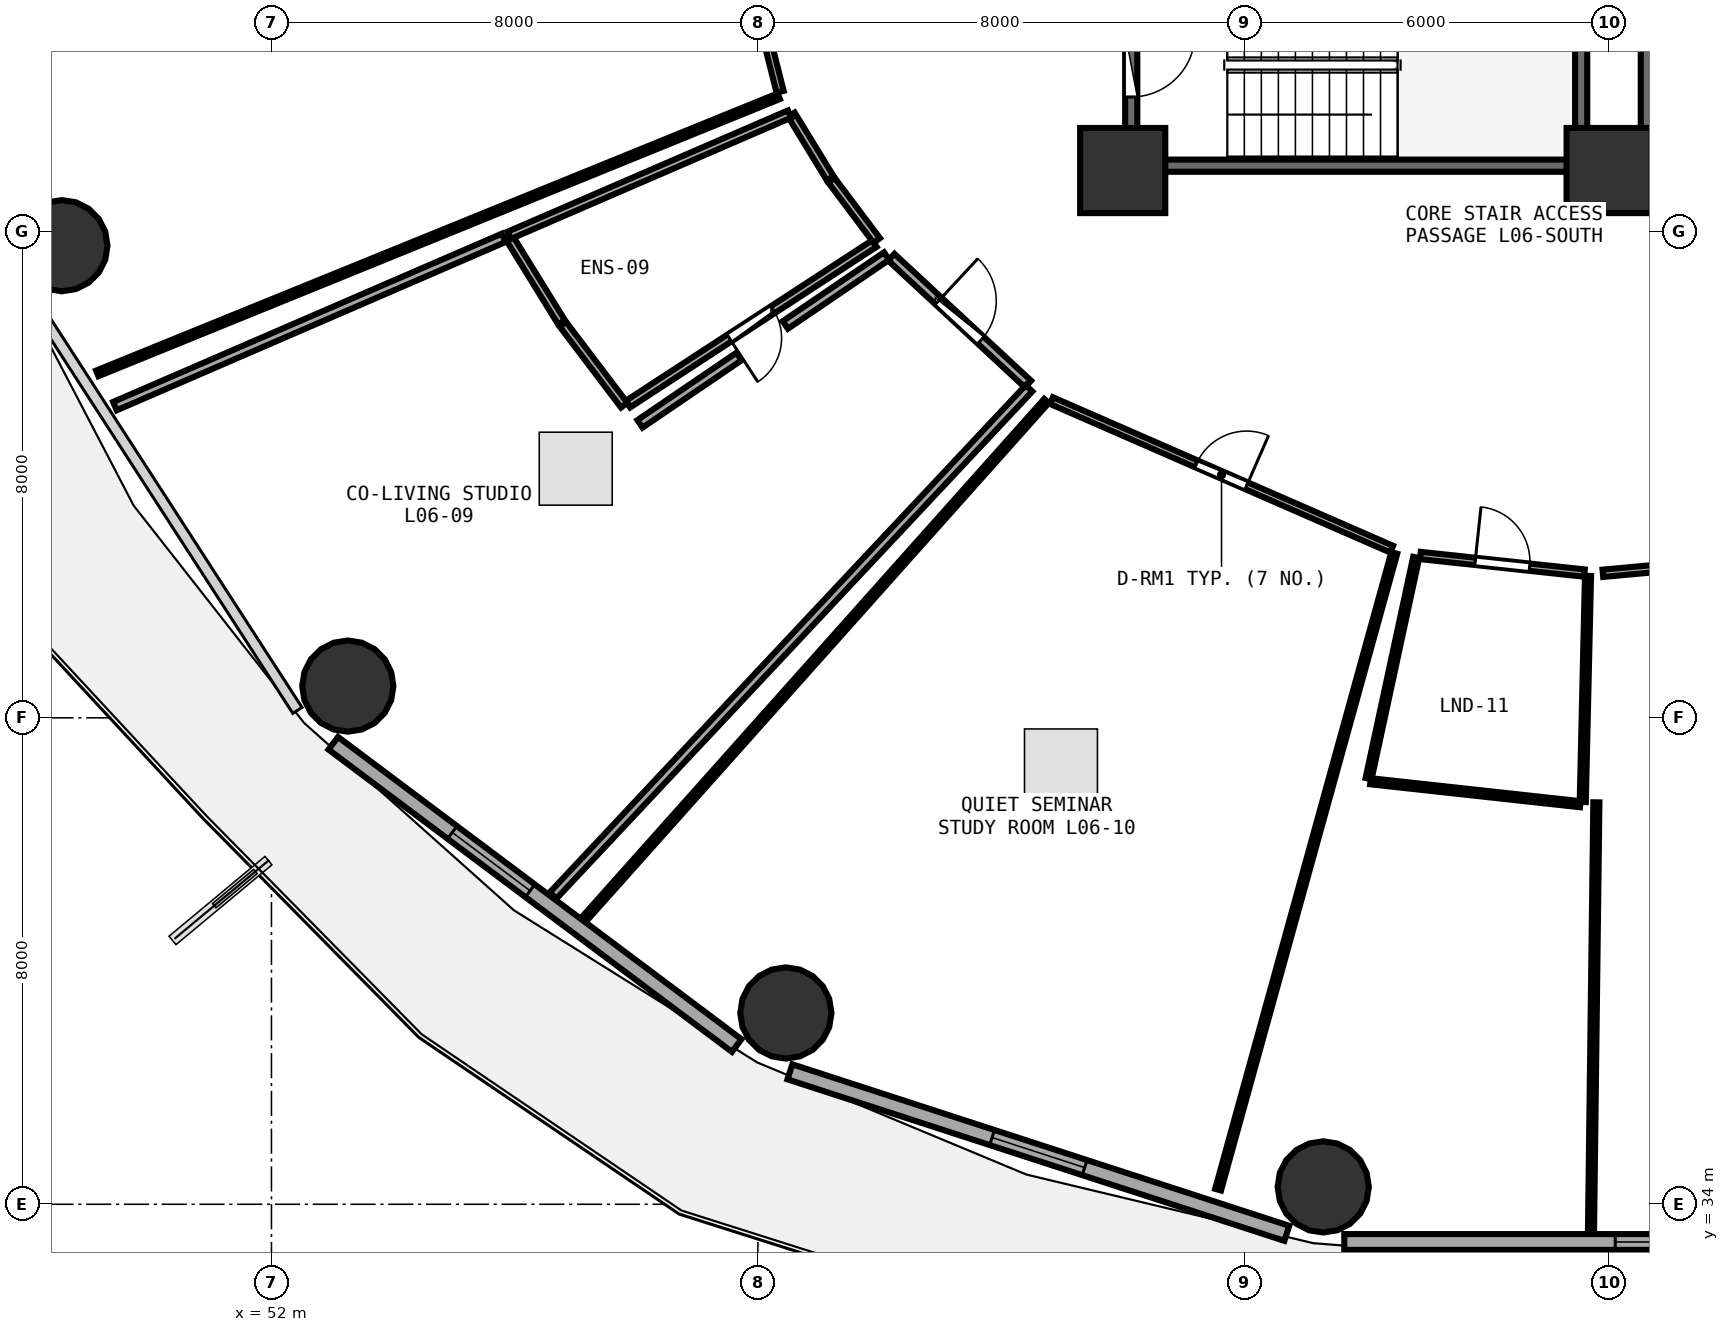
"""IFC4 building model, lengths in metres.
Left out: names, types, materials, properties, quantities, classifications, styles, units other than length and angle.
Written with IfcOpenShell. Run it as: python <this file> out.ifc"""

import sys

from ifc_helpers import new_model, si_unit, direction, frame, frame_2d, origin, origin_2d, place, context, subcontext, project, spatial, rectangle, circle, extrude, element, fill, save


model = new_model("IFC4")
c1 = context("Model", 3, precision=1e-05, world=origin(), true_north=direction((0.0, 1.0)))
c2 = subcontext(c1, "Body", "Model", "MODEL_VIEW")
j1 = project(units=[si_unit("LENGTHUNIT", "METRE"), si_unit("PLANEANGLEUNIT", "RADIAN")], contexts=[c1])
p1 = place(None, origin())
s1 = spatial("IfcSite", under=j1, at=p1, CompositionType="ELEMENT")
p2 = place(p1, origin())
s2 = spatial("IfcBuilding", under=s1, at=p2, CompositionType="ELEMENT")
p3 = place(p2, frame((0.0, 0.0, 26.25)))
s3 = spatial("IfcBuildingStorey", under=s2, at=p3, CompositionType="ELEMENT", Elevation=26.25)
for number, where, z_axis, x_axis in (
    (1, (66.0, 51.0, 0.0), (0.0, 0.0, 1.0), (1.0, 0.0, 0.0)),
    (2, (74.0, 51.0, 0.0), (0.0, 0.0, 1.0), (1.0, 0.0, 0.0)),
):
    element("IfcColumn", number, at=place(p3, frame(where, z_axis=z_axis, x_axis=x_axis)), inside=s3, PredefinedType="PILASTER", context=c2, shape_type="SweptSolid", body=[
        extrude(rectangle(XDim=1.4, YDim=1.4, at=origin_2d()), origin(), (0.0, 0.0, 1.0), 3.75),
    ])
for number, where, z_axis, x_axis in (
    (3, (48.553, 49.764, 0.0), (0.0, 0.0, 1.0), (1.0, 0.0, 0.0)),
    (4, (53.256, 42.522, 0.0), (0.0, 0.0, 1.0), (1.0, 0.0, 0.0)),
    (5, (60.46, 37.146, 0.0), (0.0, 0.0, 1.0), (1.0, 0.0, 0.0)),
    (6, (69.298, 34.286, 0.0), (0.0, 0.0, 1.0), (1.0, 0.0, 0.0)),
):
    element("IfcColumn", number, at=place(p3, frame(where, z_axis=z_axis, x_axis=x_axis)), inside=s3, PredefinedType="COLUMN", context=c2, shape_type="SweptSolid", body=[
        extrude(circle(Radius=0.75, at=origin_2d()), origin(), (0.0, 0.0, 1.0), 3.75),
    ])
p4 = place(p3, frame((53.016, 41.582, 0.0), z_axis=(0.0, 0.0, 1.0), x_axis=(0.80030733173, -0.599590005569, 0.0)))
e7 = element("IfcWall", 7, at=p4, inside=s3, PredefinedType="SOLIDWALL", context=c2, shape_type="SweptSolid", body=[
    extrude(rectangle(XDim=8.291, YDim=0.26, at=frame_2d((4.145, 0.0))), origin(), (0.0, 0.0, 1.0), 3.475),
])
p5 = place(p4, frame((2.445, 0.0, 0.85)))
e8 = element("IfcOpeningElement", 8, at=p5, cuts=e7, PredefinedType="OPENING", context=c2, shape_type="SweptSolid", body=[
    extrude(rectangle(XDim=1.6, YDim=1.45, at=frame_2d((0.8, 0.725))), frame((0.0, 0.14, 0.0), z_axis=(0.0, -1.0, 0.0), x_axis=(1.0, 0.0, 0.0)), (0.0, 0.0, 1.0), 0.28),
])
p6 = place(p3, frame((60.526, 36.178, 0.0), z_axis=(0.0, 0.0, 1.0), x_axis=(0.951039914291, -0.309068085421, 0.0)))
e9 = element("IfcWall", 9, at=p6, inside=s3, PredefinedType="SOLIDWALL", context=c2, shape_type="SweptSolid", body=[
    extrude(rectangle(XDim=8.594, YDim=0.26, at=frame_2d((4.297, 0.0))), origin(), (0.0, 0.0, 1.0), 3.475),
])
p7 = place(p6, frame((3.497, 0.0, 0.85)))
e10 = element("IfcOpeningElement", 10, at=p7, cuts=e9, PredefinedType="OPENING", context=c2, shape_type="SweptSolid", body=[
    extrude(rectangle(XDim=1.6, YDim=1.45, at=frame_2d((0.8, 0.725))), frame((0.0, 0.14, 0.0), z_axis=(0.0, -1.0, 0.0), x_axis=(1.0, 0.0, 0.0)), (0.0, 0.0, 1.0), 0.28),
])
p8 = place(p3, frame((69.644, 33.38, 0.0), z_axis=(0.0, 0.0, 1.0), x_axis=(1.0, 0.0, 0.0)))
e11 = element("IfcWall", 11, at=p8, inside=s3, PredefinedType="SOLIDWALL", context=c2, shape_type="SweptSolid", body=[
    extrude(rectangle(XDim=8.712, YDim=0.26, at=frame_2d((4.356, 0.0))), origin(), (0.0, 0.0, 1.0), 3.475),
])
p9 = place(p8, frame((4.456, 0.0, 0.85)))
e12 = element("IfcOpeningElement", 12, at=p9, cuts=e11, PredefinedType="OPENING", context=c2, shape_type="SweptSolid", body=[
    extrude(rectangle(XDim=1.6, YDim=1.45, at=frame_2d((0.8, 0.725))), frame((0.0, 0.14, 0.0), z_axis=(0.0, -1.0, 0.0), x_axis=(1.0, 0.0, 0.0)), (0.0, 0.0, 1.0), 0.28),
])
p10 = place(p3, frame((74.0, 51.08, 0.0), z_axis=(0.0, 0.0, 1.0), x_axis=(1.0, 0.0, 0.0)))
e13 = element("IfcWall", 13, at=p10, inside=s3, PredefinedType="SHEAR", context=c2, shape_type="SweptSolid", body=[
    extrude(rectangle(XDim=7.9, YDim=0.2, at=frame_2d((3.95, 0.0))), origin(), (0.0, 0.0, 1.0), 3.49),
])
p11 = place(p10, frame((1.12, 0.0, 0.0)))
e14 = element("IfcOpeningElement", 14, at=p11, cuts=e13, PredefinedType="OPENING", context=c2, shape_type="SweptSolid", body=[
    extrude(rectangle(XDim=1.05, YDim=2.1, at=frame_2d((0.525, 1.05))), frame((0.0, 0.11, 0.0), z_axis=(0.0, -1.0, 0.0), x_axis=(1.0, 0.0, 0.0)), (0.0, 0.0, 1.0), 0.22),
])
p12 = place(p3, frame((74.62, 54.27, 0.0), z_axis=(0.0, 0.0, 1.0), x_axis=(0.0, -1.0, 0.0)))
e15 = element("IfcWall", 15, at=p12, inside=s3, PredefinedType="SHEAR", context=c2, shape_type="SweptSolid", body=[
    extrude(rectangle(XDim=3.07, YDim=0.2, at=frame_2d((1.535, 0.0))), origin(), (0.0, 0.0, 1.0), 3.49),
])
p13 = place(p3, frame((66.26, 51.08, 0.0), z_axis=(0.0, 0.0, 1.0), x_axis=(1.0, 0.0, 0.0)))
e16 = element("IfcWall", 16, at=p13, inside=s3, PredefinedType="SHEAR", context=c2, shape_type="SweptSolid", body=[
    extrude(rectangle(XDim=7.16, YDim=0.2, at=frame_2d((3.58, 0.0))), origin(), (0.0, 0.0, 1.0), 3.49),
])
p14 = place(p3, frame((73.54, 51.2, 0.0), z_axis=(0.0, 0.0, 1.0), x_axis=(0.0, 1.0, 0.0)))
e17 = element("IfcWall", 17, at=p14, inside=s3, PredefinedType="SHEAR", context=c2, shape_type="SweptSolid", body=[
    extrude(rectangle(XDim=3.07, YDim=0.2, at=frame_2d((1.535, 0.0))), origin(), (0.0, 0.0, 1.0), 3.49),
])
p15 = place(p3, frame((66.14, 54.27, 0.0), z_axis=(0.0, 0.0, 1.0), x_axis=(0.0, -1.0, 0.0)))
e18 = element("IfcWall", 18, at=p15, inside=s3, PredefinedType="SHEAR", context=c2, shape_type="SweptSolid", body=[
    extrude(rectangle(XDim=3.07, YDim=0.2, at=frame_2d((1.535, 0.0))), origin(), (0.0, 0.0, 1.0), 3.49),
])
p16 = place(p15, frame((1.01, 0.0, 0.0)))
e19 = element("IfcOpeningElement", 19, at=p16, cuts=e18, PredefinedType="OPENING", context=c2, shape_type="SweptSolid", body=[
    extrude(rectangle(XDim=1.05, YDim=2.1, at=frame_2d((0.525, 1.05))), frame((0.0, 0.11, 0.0), z_axis=(0.0, -1.0, 0.0), x_axis=(1.0, 0.0, 0.0)), (0.0, 0.0, 1.0), 0.22),
])
p17 = place(p3, frame((58.986, 57.775, 0.0), z_axis=(0.0, 0.0, 1.0), x_axis=(0.244192294026, -0.969726829338, 0.0)))
e20 = element("IfcWall", 20, at=p17, inside=s3, PredefinedType="PARTITIONING", context=c2, shape_type="SweptSolid", body=[
    extrude(rectangle(XDim=5.651, YDim=0.12, at=frame_2d((2.825, 0.0))), origin(), (0.0, 0.0, 1.0), 3.48),
])
p18 = place(p17, frame((2.375, 0.0, 0.0)))
e21 = element("IfcOpeningElement", 21, at=p18, cuts=e20, PredefinedType="OPENING", context=c2, shape_type="SweptSolid", body=[
    extrude(rectangle(XDim=0.9, YDim=2.08, at=frame_2d((0.45, 1.04))), frame((0.0, 0.07, 0.0), z_axis=(0.0, -1.0, 0.0), x_axis=(1.0, 0.0, 0.0)), (0.0, 0.0, 1.0), 0.14),
])
p19 = place(p3, frame((61.917, 49.8, 0.0), z_axis=(0.0, 0.0, 1.0), x_axis=(-0.837796261941, -0.545982988267, 0.0)))
e22 = element("IfcWall", 22, at=p19, inside=s3, PredefinedType="PLUMBINGWALL", context=c2, shape_type="SweptSolid", body=[
    extrude(rectangle(XDim=4.838, YDim=0.13, at=frame_2d((2.419, 0.0))), origin(), (0.0, 0.0, 1.0), 3.235),
])
p20 = place(p19, frame((1.989, 0.0, 0.0)))
e23 = element("IfcOpeningElement", 23, at=p20, cuts=e22, PredefinedType="OPENING", context=c2, shape_type="SweptSolid", body=[
    extrude(rectangle(XDim=0.86, YDim=2.05, at=frame_2d((0.43, 1.025))), frame((0.0, 0.075, 0.0), z_axis=(0.0, -1.0, 0.0), x_axis=(1.0, 0.0, 0.0)), (0.0, 0.0, 1.0), 0.15),
])
p21 = place(p3, frame((62.194, 49.575, 0.0), z_axis=(0.0, 0.0, 1.0), x_axis=(0.7329267348, -0.680307578538, 0.0)))
e24 = element("IfcWall", 24, at=p21, inside=s3, PredefinedType="PARTITIONING", context=c2, shape_type="SweptSolid", body=[
    extrude(rectangle(XDim=3.067, YDim=0.15, at=frame_2d((1.533, 0.0))), origin(), (0.0, 0.0, 1.0), 2.875),
])
p22 = place(p21, frame((1.059, 0.0, 0.0)))
e25 = element("IfcOpeningElement", 25, at=p22, cuts=e24, PredefinedType="OPENING", context=c2, shape_type="SweptSolid", body=[
    extrude(rectangle(XDim=0.95, YDim=2.08, at=frame_2d((0.475, 1.04))), frame((0.0, 0.085, 0.0), z_axis=(0.0, -1.0, 0.0), x_axis=(1.0, 0.0, 0.0)), (0.0, 0.0, 1.0), 0.17),
])
p23 = place(p3, frame((64.828, 47.217, 0.0), z_axis=(0.0, 0.0, 1.0), x_axis=(0.916419655578, -0.400218708797, 0.0)))
e26 = element("IfcWall", 26, at=p23, inside=s3, PredefinedType="PARTITIONING", context=c2, shape_type="SweptSolid", body=[
    extrude(rectangle(XDim=6.104, YDim=0.12, at=frame_2d((3.052, 0.0))), origin(), (0.0, 0.0, 1.0), 2.875),
])
p24 = place(p23, frame((2.602, 0.0, 0.0)))
e27 = element("IfcOpeningElement", 27, at=p24, cuts=e26, PredefinedType="OPENING", context=c2, shape_type="SweptSolid", body=[
    extrude(rectangle(XDim=0.9, YDim=2.08, at=frame_2d((0.45, 1.04))), frame((0.0, 0.07, 0.0), z_axis=(0.0, -1.0, 0.0), x_axis=(1.0, 0.0, 0.0)), (0.0, 0.0, 1.0), 0.14),
])
p25 = place(p3, frame((70.895, 44.67, 0.0), z_axis=(0.0, 0.0, 1.0), x_axis=(0.994302004983, -0.106599825921, 0.0)))
e28 = element("IfcWall", 28, at=p25, inside=s3, PredefinedType="PARTITIONING", context=c2, shape_type="SweptSolid", body=[
    extrude(rectangle(XDim=2.714, YDim=0.12, at=frame_2d((1.357, 0.0))), origin(), (0.0, 0.0, 1.0), 3.235),
])
p26 = place(p25, frame((0.907, 0.0, 0.0)))
e29 = element("IfcOpeningElement", 29, at=p26, cuts=e28, PredefinedType="OPENING", context=c2, shape_type="SweptSolid", body=[
    extrude(rectangle(XDim=0.9, YDim=2.08, at=frame_2d((0.45, 1.04))), frame((0.0, 0.07, 0.0), z_axis=(0.0, -1.0, 0.0), x_axis=(1.0, 0.0, 0.0)), (0.0, 0.0, 1.0), 0.14),
])
p27 = place(p3, frame((73.897, 44.376, 0.0), z_axis=(0.0, 0.0, 1.0), x_axis=(0.995829610124, 0.091232601628, 0.0)))
e30 = element("IfcWall", 30, at=p27, inside=s3, PredefinedType="PARTITIONING", context=c2, shape_type="SweptSolid", body=[
    extrude(rectangle(XDim=3.222, YDim=0.12, at=frame_2d((1.611, 0.0))), origin(), (0.0, 0.0, 1.0), 3.235),
])
p28 = place(p27, frame((1.161, 0.0, 0.0)))
e31 = element("IfcOpeningElement", 31, at=p28, cuts=e30, PredefinedType="OPENING", context=c2, shape_type="SweptSolid", body=[
    extrude(rectangle(XDim=0.9, YDim=2.08, at=frame_2d((0.45, 1.04))), frame((0.0, 0.07, 0.0), z_axis=(0.0, -1.0, 0.0), x_axis=(1.0, 0.0, 0.0)), (0.0, 0.0, 1.0), 0.14),
])
p29 = place(p3, frame((60.343, 52.222, 0.0), z_axis=(0.0, 0.0, 1.0), x_axis=(-0.926333713065, -0.376703931542, 0.0)))
e32 = element("IfcWall", 32, at=p29, inside=s3, PredefinedType="PARTITIONING", context=c2, shape_type="SweptSolid", body=[
    extrude(rectangle(XDim=12.099, YDim=0.1, at=frame_2d((6.05, 0.0))), origin(), (0.0, 0.0, 1.0), 2.875),
])
p30 = place(p3, frame((60.549, 51.92, 0.0), z_axis=(0.0, 0.0, 1.0), x_axis=(0.52146609248, -0.853272004928, 0.0)))
e33 = element("IfcWall", 33, at=p30, inside=s3, PredefinedType="PLUMBINGWALL", context=c2, shape_type="SweptSolid", body=[
    extrude(rectangle(XDim=1.228, YDim=0.13, at=frame_2d((0.614, 0.0))), origin(), (0.0, 0.0, 1.0), 3.48),
])
p31 = place(p3, frame((61.212, 50.839, 0.0), z_axis=(0.0, 0.0, 1.0), x_axis=(0.600347056143, -0.79973959023, 0.0)))
e34 = element("IfcWall", 34, at=p31, inside=s3, PredefinedType="PLUMBINGWALL", context=c2, shape_type="SweptSolid", body=[
    extrude(rectangle(XDim=1.238, YDim=0.13, at=frame_2d((0.619, 0.0))), origin(), (0.0, 0.0, 1.0), 2.875),
])
p32 = place(p3, frame((57.801, 47.142, 0.0), z_axis=(0.0, 0.0, 1.0), x_axis=(-0.60376191721, 0.797164692725, 0.0)))
e35 = element("IfcWall", 35, at=p32, inside=s3, PredefinedType="PLUMBINGWALL", context=c2, shape_type="SweptSolid", body=[
    extrude(rectangle(XDim=1.669, YDim=0.13, at=frame_2d((0.834, 0.0))), origin(), (0.0, 0.0, 1.0), 3.175),
])
p33 = place(p3, frame((56.771, 48.505, 0.0), z_axis=(0.0, 0.0, 1.0), x_axis=(-0.525540089642, 0.850768837099, 0.0)))
e36 = element("IfcWall", 36, at=p33, inside=s3, PredefinedType="PLUMBINGWALL", context=c2, shape_type="SweptSolid", body=[
    extrude(rectangle(XDim=1.651, YDim=0.13, at=frame_2d((0.826, 0.0))), origin(), (0.0, 0.0, 1.0), 3.175),
])
p34 = place(p3, frame((55.91, 49.935, 0.0), z_axis=(0.0, 0.0, 1.0), x_axis=(0.917797204715, 0.397049481826, 0.0)))
e37 = element("IfcWall", 37, at=p34, inside=s3, PredefinedType="PLUMBINGWALL", context=c2, shape_type="SweptSolid", body=[
    extrude(rectangle(XDim=5.023, YDim=0.13, at=frame_2d((2.511, 0.0))), origin(), (0.0, 0.0, 1.0), 2.875),
])
p35 = place(p3, frame((64.458, 47.419, 0.0), z_axis=(0.0, 0.0, 1.0), x_axis=(-0.684261294523, -0.729236916796, 0.0)))
e38 = element("IfcWall", 38, at=p35, inside=s3, PredefinedType="PARTITIONING", context=c2, shape_type="SweptSolid", body=[
    extrude(rectangle(XDim=11.438, YDim=0.15, at=frame_2d((5.719, 0.0))), origin(), (0.0, 0.0, 1.0), 2.875),
])
p36 = place(p3, frame((49.426, 47.126, 0.0), z_axis=(0.0, 0.0, 1.0), x_axis=(0.917736225937, 0.397190407239, 0.0)))
e39 = element("IfcWall", 39, at=p36, inside=s3, PredefinedType="PARTITIONING", context=c2, shape_type="SweptSolid", body=[
    extrude(rectangle(XDim=6.967, YDim=0.15, at=frame_2d((3.483, 0.0))), origin(), (0.0, 0.0, 1.0), 2.875),
])
p37 = place(p3, frame((58.061, 46.834, 0.0), z_axis=(0.0, 0.0, 1.0), x_axis=(0.826811291248, 0.562479411769, 0.0)))
e40 = element("IfcWall", 40, at=p37, inside=s3, PredefinedType="PARTITIONING", context=c2, shape_type="SweptSolid", body=[
    extrude(rectangle(XDim=1.971, YDim=0.15, at=frame_2d((0.985, 0.0))), origin(), (0.0, 0.0, 1.0), 3.48),
])
p38 = place(p3, frame((60.451, 48.461, 0.0), z_axis=(0.0, 0.0, 1.0), x_axis=(0.826867883695, 0.562396215237, 0.0)))
e41 = element("IfcWall", 41, at=p38, inside=s3, PredefinedType="PARTITIONING", context=c2, shape_type="SweptSolid", body=[
    extrude(rectangle(XDim=2.014, YDim=0.15, at=frame_2d((1.007, 0.0))), origin(), (0.0, 0.0, 1.0), 3.235),
])
p39 = place(p3, frame((70.466, 44.711, 0.0), z_axis=(0.0, 0.0, 1.0), x_axis=(-0.26671307518, -0.963775977875, 0.0)))
e42 = element("IfcWall", 42, at=p39, inside=s3, PredefinedType="PARTITIONING", context=c2, shape_type="SweptSolid", body=[
    extrude(rectangle(XDim=10.865, YDim=0.1, at=frame_2d((5.432, 0.0))), origin(), (0.0, 0.0, 1.0), 2.875),
])
p40 = place(p3, frame((57.156, 38.706, 0.0), z_axis=(0.0, 0.0, 1.0), x_axis=(0.66580890104, 0.746122313897, 0.0)))
e43 = element("IfcWall", 43, at=p40, inside=s3, PredefinedType="PARTITIONING", context=c2, shape_type="SweptSolid", body=[
    extrude(rectangle(XDim=11.399, YDim=0.1, at=frame_2d((5.7, 0.0))), origin(), (0.0, 0.0, 1.0), 2.875),
])
p41 = place(p3, frame((73.652, 44.334, 0.0), z_axis=(0.0, 0.0, 1.0), x_axis=(-0.02316715399, -0.99973160547, 0.0)))
e44 = element("IfcWall", 44, at=p41, inside=s3, PredefinedType="PARTITIONING", context=c2, shape_type="SweptSolid", body=[
    extrude(rectangle(XDim=3.72, YDim=0.1, at=frame_2d((1.86, 0.0))), origin(), (0.0, 0.0, 1.0), 3.175),
])
p42 = place(p3, frame((73.525, 40.579, 0.0), z_axis=(0.0, 0.0, 1.0), x_axis=(-0.994070147468, 0.108740709544, 0.0)))
e45 = element("IfcWall", 45, at=p42, inside=s3, PredefinedType="PARTITIONING", context=c2, shape_type="SweptSolid", body=[
    extrude(rectangle(XDim=3.471, YDim=0.1, at=frame_2d((1.735, 0.0))), origin(), (0.0, 0.0, 1.0), 3.175),
])
p43 = place(p3, frame((70.043, 41.0, 0.0), z_axis=(0.0, 0.0, 1.0), x_axis=(0.210519412271, 0.977589677246, 0.0)))
e46 = element("IfcWall", 46, at=p43, inside=s3, PredefinedType="PARTITIONING", context=c2, shape_type="SweptSolid", body=[
    extrude(rectangle(XDim=3.72, YDim=0.1, at=frame_2d((1.86, 0.0))), origin(), (0.0, 0.0, 1.0), 3.175),
])
p44 = place(p3, frame((73.701, 33.561, 0.0), z_axis=(0.0, 0.0, 1.0), x_axis=(0.012537113793, 0.9999214073, 0.0)))
e47 = element("IfcWall", 47, at=p44, inside=s3, PredefinedType="PARTITIONING", context=c2, shape_type="SweptSolid", body=[
    extrude(rectangle(XDim=7.049, YDim=0.1, at=frame_2d((3.525, 0.0))), origin(), (0.0, 0.0, 1.0), 2.875),
])
p45 = place(p5, origin())
e48 = element("IfcWindow", 48, at=p45, inside=s3, PartitioningType="SINGLE_PANEL", PredefinedType="WINDOW", context=c2, shape_type="SweptSolid", body=[
    extrude(rectangle(XDim=1.6, YDim=1.45, at=frame_2d((0.8, 0.725))), frame((0.0, 0.03, 0.0), z_axis=(0.0, -1.0, 0.0), x_axis=(1.0, 0.0, 0.0)), (0.0, 0.0, 1.0), 0.06),
])
fill(e8, e48)
p46 = place(p7, origin())
e49 = element("IfcWindow", 49, at=p46, inside=s3, PartitioningType="SINGLE_PANEL", PredefinedType="WINDOW", context=c2, shape_type="SweptSolid", body=[
    extrude(rectangle(XDim=1.6, YDim=1.45, at=frame_2d((0.8, 0.725))), frame((0.0, 0.03, 0.0), z_axis=(0.0, -1.0, 0.0), x_axis=(1.0, 0.0, 0.0)), (0.0, 0.0, 1.0), 0.06),
])
fill(e10, e49)
p47 = place(p9, origin())
e50 = element("IfcWindow", 50, at=p47, inside=s3, PartitioningType="SINGLE_PANEL", PredefinedType="WINDOW", context=c2, shape_type="SweptSolid", body=[
    extrude(rectangle(XDim=1.6, YDim=1.45, at=frame_2d((0.8, 0.725))), frame((0.0, 0.03, 0.0), z_axis=(0.0, -1.0, 0.0), x_axis=(1.0, 0.0, 0.0)), (0.0, 0.0, 1.0), 0.06),
])
fill(e12, e50)
p48 = place(p16, origin())
e51 = element("IfcDoor", 51, at=p48, inside=s3, OperationType="SINGLE_SWING_LEFT", PredefinedType="DOOR", context=c2, shape_type="SweptSolid", body=[
    extrude(rectangle(XDim=1.05, YDim=2.1, at=frame_2d((0.525, 1.05))), frame((0.0, 0.025, 0.0), z_axis=(0.0, -1.0, 0.0), x_axis=(1.0, 0.0, 0.0)), (0.0, 0.0, 1.0), 0.05),
])
fill(e19, e51)
p49 = place(p20, origin())
e52 = element("IfcDoor", 52, at=p49, inside=s3, OperationType="SINGLE_SWING_RIGHT", PredefinedType="DOOR", context=c2, shape_type="SweptSolid", body=[
    extrude(rectangle(XDim=0.86, YDim=2.05, at=frame_2d((0.43, 1.025))), frame((0.0, 0.025, 0.0), z_axis=(0.0, -1.0, 0.0), x_axis=(1.0, 0.0, 0.0)), (0.0, 0.0, 1.0), 0.05),
])
fill(e23, e52)
p50 = place(p22, origin())
e53 = element("IfcDoor", 53, at=p50, inside=s3, OperationType="SINGLE_SWING_LEFT", PredefinedType="DOOR", context=c2, shape_type="SweptSolid", body=[
    extrude(rectangle(XDim=0.95, YDim=2.08, at=frame_2d((0.475, 1.04))), frame((0.0, 0.025, 0.0), z_axis=(0.0, -1.0, 0.0), x_axis=(1.0, 0.0, 0.0)), (0.0, 0.0, 1.0), 0.05),
])
fill(e25, e53)
p51 = place(p24, origin())
e54 = element("IfcDoor", 54, at=p51, inside=s3, OperationType="SINGLE_SWING_RIGHT", PredefinedType="DOOR", context=c2, shape_type="SweptSolid", body=[
    extrude(rectangle(XDim=0.9, YDim=2.08, at=frame_2d((0.45, 1.04))), frame((0.0, 0.025, 0.0), z_axis=(0.0, -1.0, 0.0), x_axis=(1.0, 0.0, 0.0)), (0.0, 0.0, 1.0), 0.05),
])
fill(e27, e54)
p52 = place(p26, origin())
e55 = element("IfcDoor", 55, at=p52, inside=s3, OperationType="SINGLE_SWING_LEFT", PredefinedType="DOOR", context=c2, shape_type="SweptSolid", body=[
    extrude(rectangle(XDim=0.9, YDim=2.08, at=frame_2d((0.45, 1.04))), frame((0.0, 0.025, 0.0), z_axis=(0.0, -1.0, 0.0), x_axis=(1.0, 0.0, 0.0)), (0.0, 0.0, 1.0), 0.05),
])
fill(e29, e55)
save(model, sys.argv[1])
